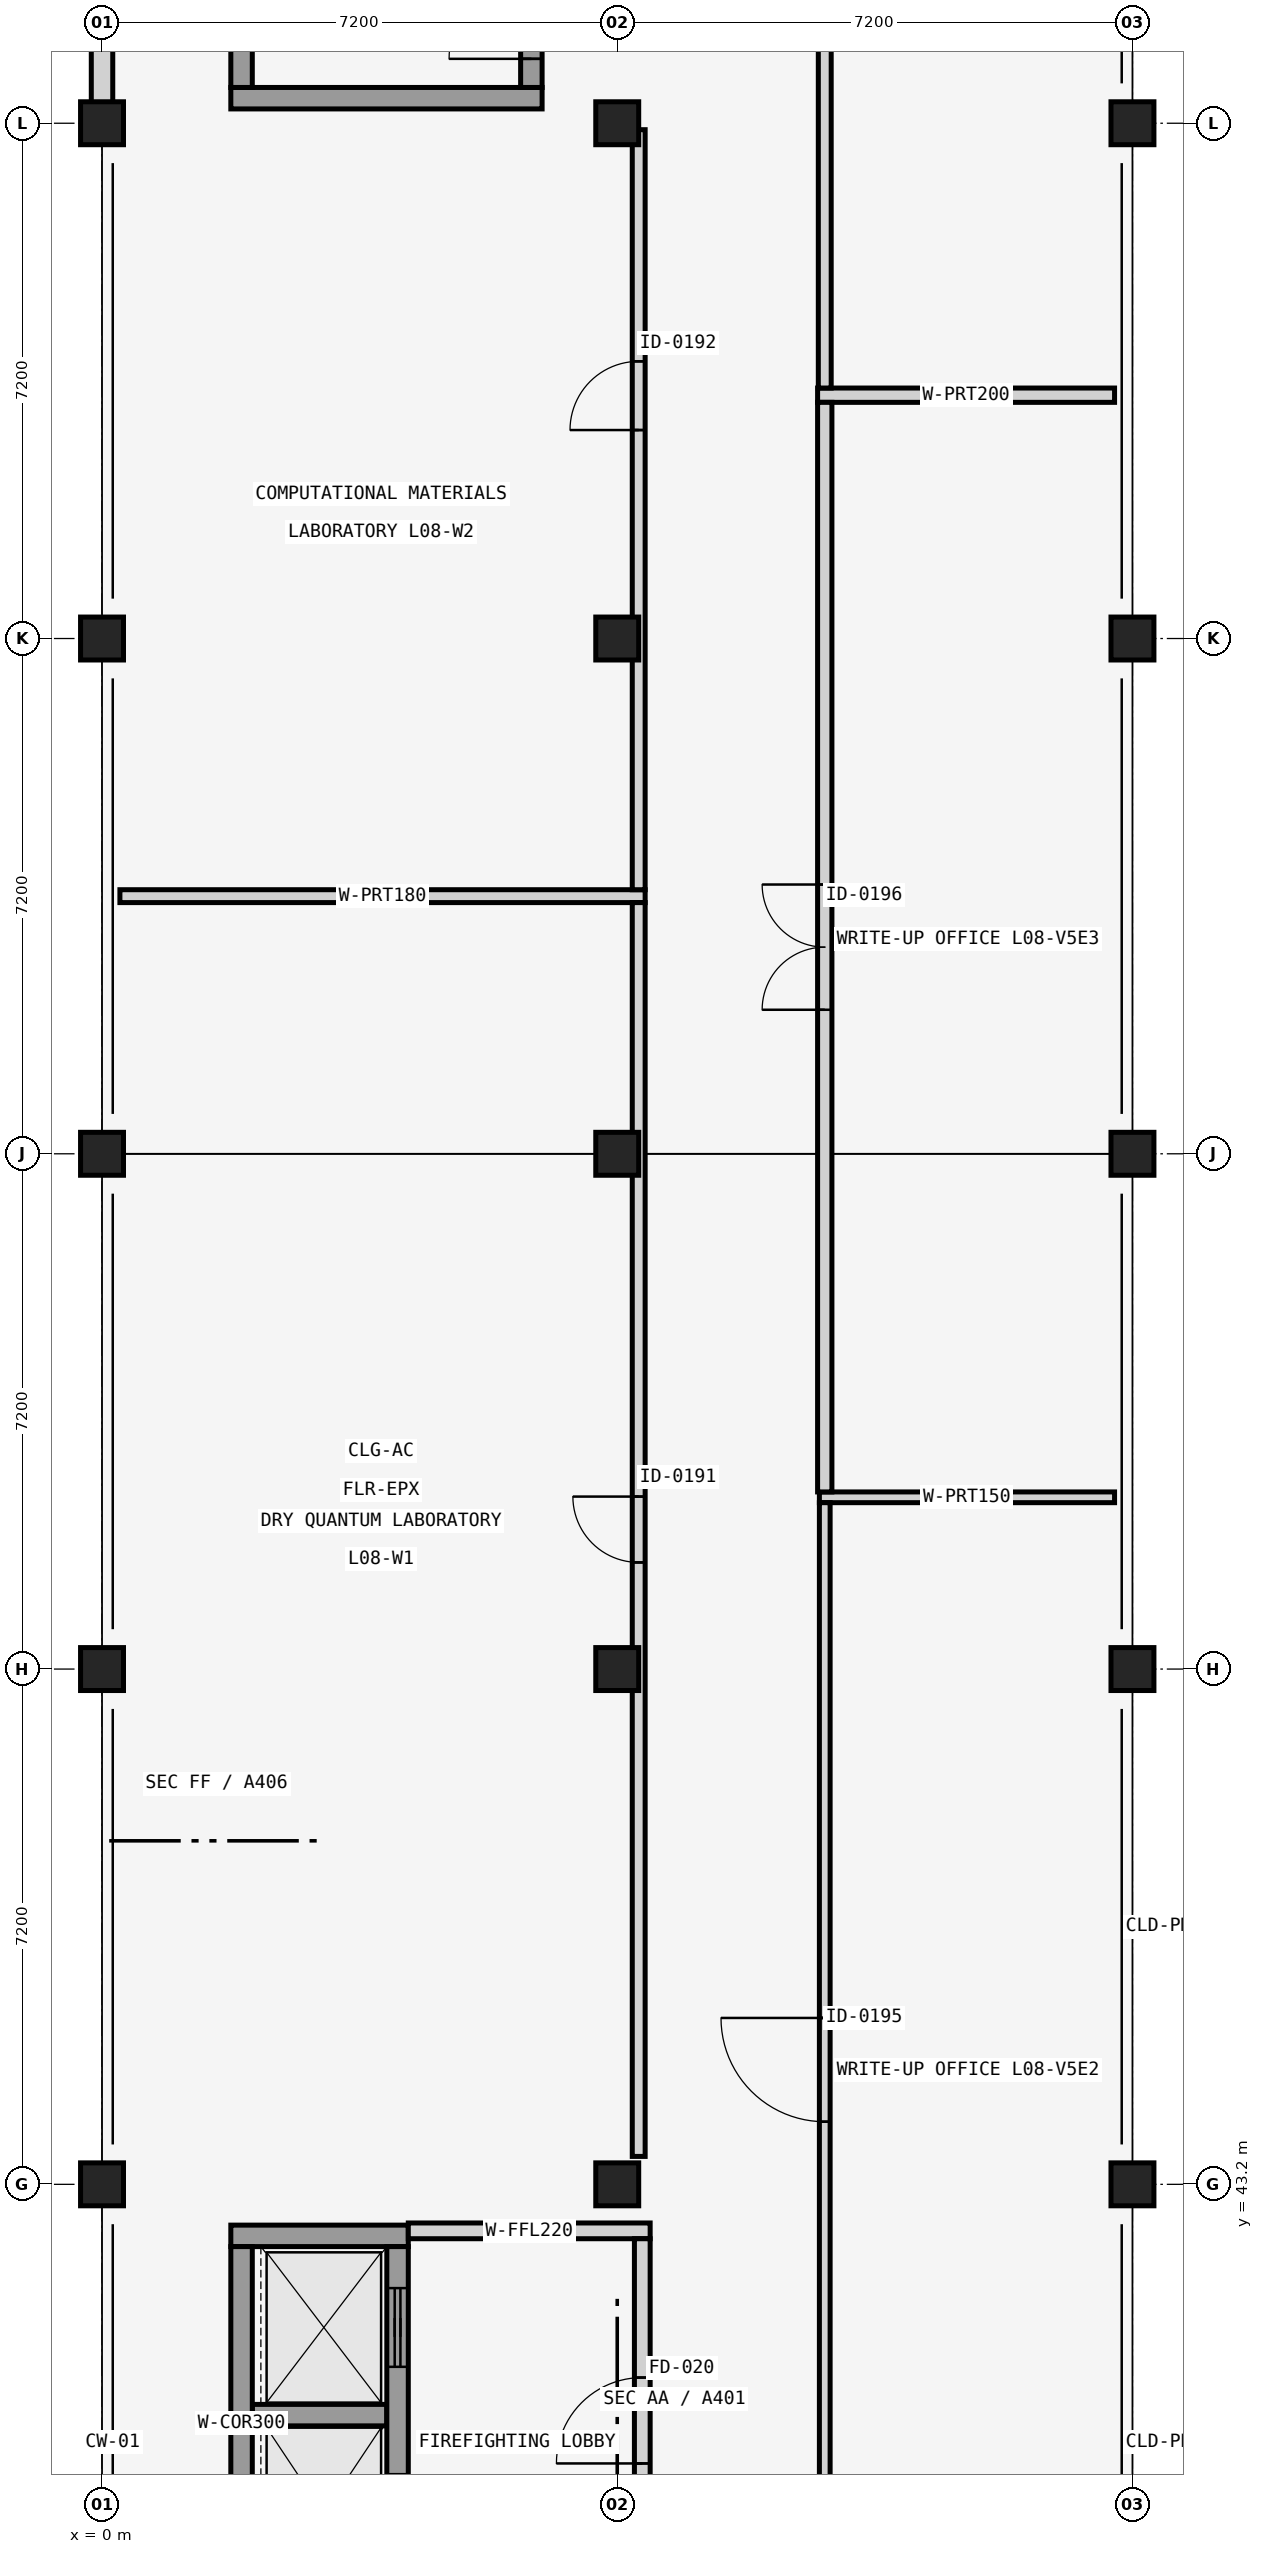
"""IFC4 building model, lengths in metres.
Left out: names, types, materials, properties, quantities, classifications, styles, units other than length and angle.
Written with IfcOpenShell. Run it as: python <this file> out.ifc"""

import sys

from ifc_helpers import new_model, si_unit, direction, frame, frame_2d, origin, origin_2d, place, context, subcontext, project, spatial, rectangle, extrude, element, fill, save


model = new_model("IFC4")
c1 = context("Model", 3, precision=1e-05, world=origin(), true_north=direction((0.0, 1.0)))
c2 = subcontext(c1, "Body", "Model", "MODEL_VIEW")
j1 = project(units=[si_unit("LENGTHUNIT", "METRE"), si_unit("PLANEANGLEUNIT", "RADIAN")], contexts=[c1])
p1 = place(None, origin())
s1 = spatial("IfcSite", under=j1, at=p1, CompositionType="ELEMENT")
p2 = place(p1, origin())
s2 = spatial("IfcBuilding", under=s1, at=p2, CompositionType="ELEMENT")
p3 = place(p2, frame((0.0, 0.0, 33.92)))
s3 = spatial("IfcBuildingStorey", under=s2, at=p3, CompositionType="ELEMENT", Elevation=33.92)
for number, where, z_axis, x_axis in (
    (1, (0.0, 43.2, 0.0), (0.0, 0.0, 1.0), (1.0, 0.0, 0.0)),
    (2, (0.0, 50.4, 0.0), (0.0, 0.0, 1.0), (1.0, 0.0, 0.0)),
    (3, (0.0, 57.6, 0.0), (0.0, 0.0, 1.0), (1.0, 0.0, 0.0)),
    (4, (0.0, 64.8, 0.0), (0.0, 0.0, 1.0), (1.0, 0.0, 0.0)),
    (5, (0.0, 72.0, 0.0), (0.0, 0.0, 1.0), (1.0, 0.0, 0.0)),
    (6, (7.2, 43.2, 0.0), (0.0, 0.0, 1.0), (1.0, 0.0, 0.0)),
    (7, (7.2, 50.4, 0.0), (0.0, 0.0, 1.0), (1.0, 0.0, 0.0)),
    (8, (7.2, 57.6, 0.0), (0.0, 0.0, 1.0), (1.0, 0.0, 0.0)),
    (9, (7.2, 64.8, 0.0), (0.0, 0.0, 1.0), (1.0, 0.0, 0.0)),
    (10, (7.2, 72.0, 0.0), (0.0, 0.0, 1.0), (1.0, 0.0, 0.0)),
    (11, (14.4, 43.2, 0.0), (0.0, 0.0, 1.0), (1.0, 0.0, 0.0)),
    (12, (14.4, 50.4, 0.0), (0.0, 0.0, 1.0), (1.0, 0.0, 0.0)),
    (13, (14.4, 57.6, 0.0), (0.0, 0.0, 1.0), (1.0, 0.0, 0.0)),
    (14, (14.4, 64.8, 0.0), (0.0, 0.0, 1.0), (1.0, 0.0, 0.0)),
    (15, (14.4, 72.0, 0.0), (0.0, 0.0, 1.0), (1.0, 0.0, 0.0)),
):
    element("IfcColumn", number, at=place(p3, frame(where, z_axis=z_axis, x_axis=x_axis)), inside=s3, PredefinedType="COLUMN", context=c2, shape_type="SweptSolid", body=[
        extrude(rectangle(XDim=0.6, YDim=0.6, at=origin_2d()), origin(), (0.0, 0.0, 1.0), 4.16),
    ])
p4 = place(p3, frame((0.0, 72.29, 0.0), z_axis=(0.0, 0.0, 1.0), x_axis=(0.0, 1.0, 0.0)))
e16 = element("IfcWall", 16, at=p4, inside=s3, PredefinedType="SOLIDWALL", context=c2, shape_type="SweptSolid", body=[
    extrude(rectangle(XDim=6.62, YDim=0.3, at=frame_2d((3.31, 0.0))), origin(), (0.0, 0.0, 1.0), 3.21),
])
p5 = place(p4, frame((3.085, 0.0, 0.65)))
e17 = element("IfcOpeningElement", 17, at=p5, cuts=e16, PredefinedType="OPENING", context=c2, shape_type="SweptSolid", body=[
    extrude(rectangle(XDim=0.45, YDim=2.4, at=frame_2d((0.225, 1.2))), frame((0.0, 0.16, 0.0), z_axis=(0.0, -1.0, 0.0), x_axis=(1.0, 0.0, 0.0)), (0.0, 0.0, 1.0), 0.32),
])
p6 = place(p3, frame((1.8, 42.48, 0.0), z_axis=(0.0, 0.0, 1.0), x_axis=(1.0, 0.0, 0.0)))
e18 = element("IfcWall", 18, at=p6, inside=s3, PredefinedType="SHEAR", context=c2, shape_type="SweptSolid", body=[
    extrude(rectangle(XDim=2.48, YDim=0.3, at=frame_2d((1.24, 0.0))), origin(), (0.0, 0.0, 1.0), 3.81),
])
p7 = place(p3, frame((2.1, 39.975, 0.0), z_axis=(0.0, 0.0, 1.0), x_axis=(1.0, 0.0, 0.0)))
e19 = element("IfcWall", 19, at=p7, inside=s3, PredefinedType="SHEAR", context=c2, shape_type="SweptSolid", body=[
    extrude(rectangle(XDim=1.88, YDim=0.3, at=frame_2d((0.94, 0.0))), origin(), (0.0, 0.0, 1.0), 3.81),
])
p8 = place(p3, frame((1.95, 37.4, 0.0), z_axis=(0.0, 0.0, 1.0), x_axis=(0.0, 1.0, 0.0)))
e20 = element("IfcWall", 20, at=p8, inside=s3, PredefinedType="SHEAR", context=c2, shape_type="SweptSolid", body=[
    extrude(rectangle(XDim=4.93, YDim=0.3, at=frame_2d((2.465, 0.0))), origin(), (0.0, 0.0, 1.0), 3.81),
])
p9 = place(p3, frame((4.13, 37.4, 0.0), z_axis=(0.0, 0.0, 1.0), x_axis=(0.0, 1.0, 0.0)))
e21 = element("IfcWall", 21, at=p9, inside=s3, PredefinedType="SHEAR", context=c2, shape_type="SweptSolid", body=[
    extrude(rectangle(XDim=4.93, YDim=0.3, at=frame_2d((2.465, 0.0))), origin(), (0.0, 0.0, 1.0), 3.81),
])
p10 = place(p9, frame((0.65, 0.0, 0.0)))
e22 = element("IfcOpeningElement", 22, at=p10, cuts=e21, PredefinedType="OPENING", context=c2, shape_type="SweptSolid", body=[
    extrude(rectangle(XDim=1.1, YDim=2.2, at=frame_2d((0.55, 1.1))), frame((0.0, 0.16, 0.0), z_axis=(0.0, -1.0, 0.0), x_axis=(1.0, 0.0, 0.0)), (0.0, 0.0, 1.0), 0.32),
])
p11 = place(p9, frame((3.25, 0.0, 0.0)))
e23 = element("IfcOpeningElement", 23, at=p11, cuts=e21, PredefinedType="OPENING", context=c2, shape_type="SweptSolid", body=[
    extrude(rectangle(XDim=1.1, YDim=2.2, at=frame_2d((0.55, 1.1))), frame((0.0, 0.16, 0.0), z_axis=(0.0, -1.0, 0.0), x_axis=(1.0, 0.0, 0.0)), (0.0, 0.0, 1.0), 0.32),
])
p12 = place(p3, frame((4.28, 42.55, 0.0), z_axis=(0.0, 0.0, 1.0), x_axis=(1.0, 0.0, 0.0)))
e24 = element("IfcWall", 24, at=p12, inside=s3, PredefinedType="SOLIDWALL", context=c2, shape_type="SweptSolid", body=[
    extrude(rectangle(XDim=3.38, YDim=0.22, at=frame_2d((1.69, 0.0))), origin(), (0.0, 0.0, 1.0), 3.01),
])
p13 = place(p3, frame((7.55, 37.36, 0.0), z_axis=(0.0, 0.0, 1.0), x_axis=(0.0, 1.0, 0.0)))
e25 = element("IfcWall", 25, at=p13, inside=s3, PredefinedType="SOLIDWALL", context=c2, shape_type="SweptSolid", body=[
    extrude(rectangle(XDim=5.08, YDim=0.22, at=frame_2d((2.54, 0.0))), origin(), (0.0, 0.0, 1.0), 3.51),
])
p14 = place(p13, frame((1.94, 0.0, 0.0)))
e26 = element("IfcOpeningElement", 26, at=p14, cuts=e25, PredefinedType="OPENING", context=c2, shape_type="SweptSolid", body=[
    extrude(rectangle(XDim=1.2, YDim=2.2, at=frame_2d((0.6, 1.1))), frame((0.0, 0.12, 0.0), z_axis=(0.0, -1.0, 0.0), x_axis=(1.0, 0.0, 0.0)), (0.0, 0.0, 1.0), 0.24),
])
p15 = place(p3, frame((1.8, 72.35, 0.0), z_axis=(0.0, 0.0, 1.0), x_axis=(1.0, 0.0, 0.0)))
e27 = element("IfcWall", 27, at=p15, inside=s3, PredefinedType="SHEAR", context=c2, shape_type="SweptSolid", body=[
    extrude(rectangle(XDim=4.35, YDim=0.3, at=frame_2d((2.175, 0.0))), origin(), (0.0, 0.0, 1.0), 3.81),
])
p16 = place(p3, frame((1.95, 72.5, 0.0), z_axis=(0.0, 0.0, 1.0), x_axis=(0.0, 1.0, 0.0)))
e28 = element("IfcWall", 28, at=p16, inside=s3, PredefinedType="SHEAR", context=c2, shape_type="SweptSolid", body=[
    extrude(rectangle(XDim=7.8, YDim=0.3, at=frame_2d((3.9, 0.0))), origin(), (0.0, 0.0, 1.0), 3.81),
])
p17 = place(p3, frame((6.0, 72.5, 0.0), z_axis=(0.0, 0.0, 1.0), x_axis=(0.0, 1.0, 0.0)))
e29 = element("IfcWall", 29, at=p17, inside=s3, PredefinedType="SHEAR", context=c2, shape_type="SweptSolid", body=[
    extrude(rectangle(XDim=7.8, YDim=0.3, at=frame_2d((3.9, 0.0))), origin(), (0.0, 0.0, 1.0), 3.81),
])
p18 = place(p17, frame((0.4, 0.0, 0.0)))
e30 = element("IfcOpeningElement", 30, at=p18, cuts=e29, PredefinedType="OPENING", context=c2, shape_type="SweptSolid", body=[
    extrude(rectangle(XDim=1.15, YDim=2.2, at=frame_2d((0.575, 1.1))), frame((0.0, 0.16, 0.0), z_axis=(0.0, -1.0, 0.0), x_axis=(1.0, 0.0, 0.0)), (0.0, 0.0, 1.0), 0.32),
])
p19 = place(p3, frame((0.25, 61.2, 0.0), z_axis=(0.0, 0.0, 1.0), x_axis=(1.0, 0.0, 0.0)))
e31 = element("IfcWall", 31, at=p19, inside=s3, PredefinedType="PARTITIONING", context=c2, shape_type="SweptSolid", body=[
    extrude(rectangle(XDim=7.34, YDim=0.18, at=frame_2d((3.67, 0.0))), origin(), (0.0, 0.0, 1.0), 3.21),
])
p20 = place(p3, frame((7.5, 43.59, 0.0), z_axis=(0.0, 0.0, 1.0), x_axis=(0.0, 1.0, 0.0)))
e32 = element("IfcWall", 32, at=p20, inside=s3, PredefinedType="PARTITIONING", context=c2, shape_type="SweptSolid", body=[
    extrude(rectangle(XDim=17.52, YDim=0.18, at=frame_2d((8.76, 0.0))), origin(), (0.0, 0.0, 1.0), 3.21),
])
p21 = place(p20, frame((8.3, 0.0, 0.0)))
e33 = element("IfcOpeningElement", 33, at=p21, cuts=e32, PredefinedType="OPENING", context=c2, shape_type="SweptSolid", body=[
    extrude(rectangle(XDim=0.92, YDim=2.15, at=frame_2d((0.46, 1.075))), frame((0.0, 0.1, 0.0), z_axis=(0.0, -1.0, 0.0), x_axis=(1.0, 0.0, 0.0)), (0.0, 0.0, 1.0), 0.2),
])
p22 = place(p3, frame((7.5, 61.29, 0.0), z_axis=(0.0, 0.0, 1.0), x_axis=(0.0, 1.0, 0.0)))
e34 = element("IfcWall", 34, at=p22, inside=s3, PredefinedType="PARTITIONING", context=c2, shape_type="SweptSolid", body=[
    extrude(rectangle(XDim=10.62, YDim=0.18, at=frame_2d((5.31, 0.0))), origin(), (0.0, 0.0, 1.0), 3.21),
])
p23 = place(p22, frame((6.423, 0.0, 0.0)))
e35 = element("IfcOpeningElement", 35, at=p23, cuts=e34, PredefinedType="OPENING", context=c2, shape_type="SweptSolid", body=[
    extrude(rectangle(XDim=0.96, YDim=2.15, at=frame_2d((0.48, 1.075))), frame((0.0, 0.1, 0.0), z_axis=(0.0, -1.0, 0.0), x_axis=(1.0, 0.0, 0.0)), (0.0, 0.0, 1.0), 0.2),
])
p24 = place(p3, frame((10.025, 52.8, 0.0), z_axis=(0.0, 0.0, 1.0), x_axis=(1.0, 0.0, 0.0)))
e36 = element("IfcWall", 36, at=p24, inside=s3, PredefinedType="PARTITIONING", context=c2, shape_type="SweptSolid", body=[
    extrude(rectangle(XDim=4.125, YDim=0.15, at=frame_2d((2.062, 0.0))), origin(), (0.0, 0.0, 1.0), 3.81),
])
p25 = place(p3, frame((10.1, 36.875, 0.0), z_axis=(0.0, 0.0, 1.0), x_axis=(0.0, 1.0, 0.0)))
e37 = element("IfcWall", 37, at=p25, inside=s3, PredefinedType="PARTITIONING", context=c2, shape_type="SweptSolid", body=[
    extrude(rectangle(XDim=15.85, YDim=0.15, at=frame_2d((7.925, 0.0))), origin(), (0.0, 0.0, 1.0), 3.21),
])
p26 = place(p25, frame((7.2, 0.0, 0.0)))
e38 = element("IfcOpeningElement", 38, at=p26, cuts=e37, PredefinedType="OPENING", context=c2, shape_type="SweptSolid", body=[
    extrude(rectangle(XDim=1.45, YDim=2.2, at=frame_2d((0.725, 1.1))), frame((0.0, 0.085, 0.0), z_axis=(0.0, -1.0, 0.0), x_axis=(1.0, 0.0, 0.0)), (0.0, 0.0, 1.0), 0.17),
])
p27 = place(p3, frame((10.0, 68.2, 0.0), z_axis=(0.0, 0.0, 1.0), x_axis=(1.0, 0.0, 0.0)))
e39 = element("IfcWall", 39, at=p27, inside=s3, PredefinedType="PARTITIONING", context=c2, shape_type="SweptSolid", body=[
    extrude(rectangle(XDim=4.15, YDim=0.2, at=frame_2d((2.075, 0.0))), origin(), (0.0, 0.0, 1.0), 3.21),
])
p28 = place(p3, frame((10.1, 52.875, 0.0), z_axis=(0.0, 0.0, 1.0), x_axis=(0.0, 1.0, 0.0)))
e40 = element("IfcWall", 40, at=p28, inside=s3, PredefinedType="PARTITIONING", context=c2, shape_type="SweptSolid", body=[
    extrude(rectangle(XDim=15.225, YDim=0.2, at=frame_2d((7.613, 0.0))), origin(), (0.0, 0.0, 1.0), 3.21),
])
p29 = place(p28, frame((6.738, 0.0, 0.0)))
e41 = element("IfcOpeningElement", 41, at=p29, cuts=e40, PredefinedType="OPENING", context=c2, shape_type="SweptSolid", body=[
    extrude(rectangle(XDim=1.75, YDim=2.25, at=frame_2d((0.875, 1.125))), frame((0.0, 0.11, 0.0), z_axis=(0.0, -1.0, 0.0), x_axis=(1.0, 0.0, 0.0)), (0.0, 0.0, 1.0), 0.22),
])
p30 = place(p3, frame((10.1, 68.3, 0.0), z_axis=(0.0, 0.0, 1.0), x_axis=(0.0, 1.0, 0.0)))
e42 = element("IfcWall", 42, at=p30, inside=s3, PredefinedType="PARTITIONING", context=c2, shape_type="SweptSolid", body=[
    extrude(rectangle(XDim=14.21, YDim=0.18, at=frame_2d((7.105, 0.0))), origin(), (0.0, 0.0, 1.0), 3.21),
])
p31 = place(p30, frame((6.65, 0.0, 0.0)))
e43 = element("IfcOpeningElement", 43, at=p31, cuts=e42, PredefinedType="OPENING", context=c2, shape_type="SweptSolid", body=[
    extrude(rectangle(XDim=0.91, YDim=2.08, at=frame_2d((0.455, 1.04))), frame((0.0, 0.1, 0.0), z_axis=(0.0, -1.0, 0.0), x_axis=(1.0, 0.0, 0.0)), (0.0, 0.0, 1.0), 0.2),
])
p32 = place(p11, origin())
e44 = element("IfcDoor", 44, at=p32, inside=s3, OperationType="SLIDING_TO_LEFT", PredefinedType="DOOR", context=c2, shape_type="SweptSolid", body=[
    extrude(rectangle(XDim=1.1, YDim=2.2, at=frame_2d((0.55, 1.1))), frame((0.0, 0.025, 0.0), z_axis=(0.0, -1.0, 0.0), x_axis=(1.0, 0.0, 0.0)), (0.0, 0.0, 1.0), 0.05),
])
fill(e23, e44)
p33 = place(p14, origin())
e45 = element("IfcDoor", 45, at=p33, inside=s3, OperationType="SINGLE_SWING_LEFT", PredefinedType="DOOR", context=c2, shape_type="SweptSolid", body=[
    extrude(rectangle(XDim=1.2, YDim=2.2, at=frame_2d((0.6, 1.1))), frame((0.0, 0.025, 0.0), z_axis=(0.0, -1.0, 0.0), x_axis=(1.0, 0.0, 0.0)), (0.0, 0.0, 1.0), 0.05),
])
fill(e26, e45)
p34 = place(p18, origin())
e46 = element("IfcDoor", 46, at=p34, inside=s3, OperationType="SINGLE_SWING_LEFT", PredefinedType="DOOR", context=c2, shape_type="SweptSolid", body=[
    extrude(rectangle(XDim=1.15, YDim=2.2, at=frame_2d((0.575, 1.1))), frame((0.0, 0.025, 0.0), z_axis=(0.0, -1.0, 0.0), x_axis=(1.0, 0.0, 0.0)), (0.0, 0.0, 1.0), 0.05),
])
fill(e30, e46)
p35 = place(p21, origin())
e47 = element("IfcDoor", 47, at=p35, inside=s3, OperationType="SINGLE_SWING_RIGHT", PredefinedType="DOOR", context=c2, shape_type="SweptSolid", body=[
    extrude(rectangle(XDim=0.92, YDim=2.15, at=frame_2d((0.46, 1.075))), frame((0.0, 0.025, 0.0), z_axis=(0.0, -1.0, 0.0), x_axis=(1.0, 0.0, 0.0)), (0.0, 0.0, 1.0), 0.05),
])
fill(e33, e47)
p36 = place(p23, origin())
e48 = element("IfcDoor", 48, at=p36, inside=s3, OperationType="SINGLE_SWING_LEFT", PredefinedType="DOOR", context=c2, shape_type="SweptSolid", body=[
    extrude(rectangle(XDim=0.96, YDim=2.15, at=frame_2d((0.48, 1.075))), frame((0.0, 0.025, 0.0), z_axis=(0.0, -1.0, 0.0), x_axis=(1.0, 0.0, 0.0)), (0.0, 0.0, 1.0), 0.05),
])
fill(e35, e48)
p37 = place(p26, origin())
e49 = element("IfcDoor", 49, at=p37, inside=s3, OperationType="SINGLE_SWING_RIGHT", PredefinedType="DOOR", context=c2, shape_type="SweptSolid", body=[
    extrude(rectangle(XDim=1.45, YDim=2.2, at=frame_2d((0.725, 1.1))), frame((0.0, 0.025, 0.0), z_axis=(0.0, -1.0, 0.0), x_axis=(1.0, 0.0, 0.0)), (0.0, 0.0, 1.0), 0.05),
])
fill(e38, e49)
p38 = place(p29, origin())
e50 = element("IfcDoor", 50, at=p38, inside=s3, OperationType="DOUBLE_DOOR_SINGLE_SWING", PredefinedType="DOOR", context=c2, shape_type="SweptSolid", body=[
    extrude(rectangle(XDim=1.75, YDim=2.25, at=frame_2d((0.875, 1.125))), frame((0.0, 0.025, 0.0), z_axis=(0.0, -1.0, 0.0), x_axis=(1.0, 0.0, 0.0)), (0.0, 0.0, 1.0), 0.05),
])
fill(e41, e50)
save(model, sys.argv[1])
